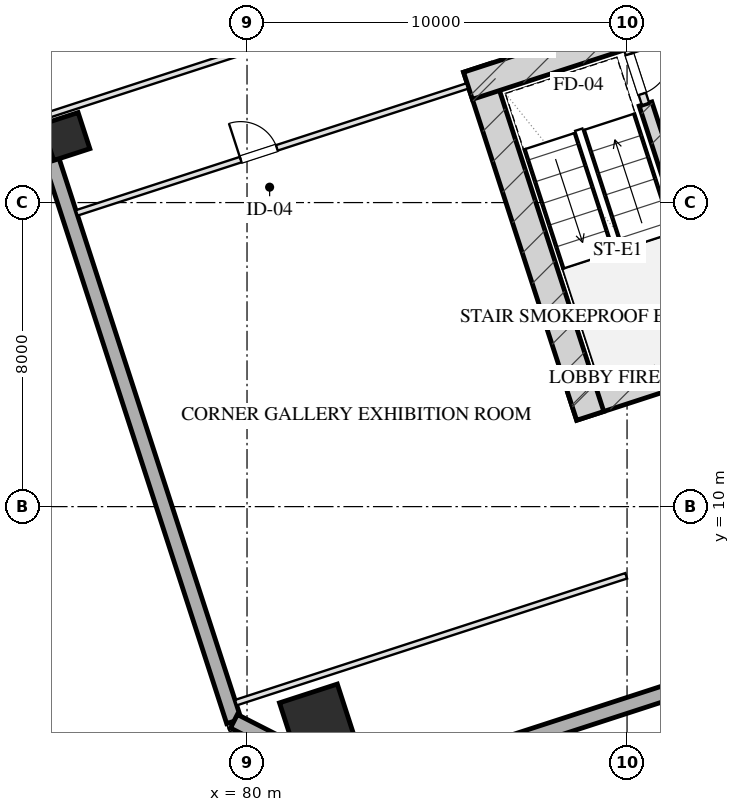
"""IFC4 building model, lengths in metres.
Left out: names, types, materials, properties, quantities, classifications, styles, units other than length and angle.
Written with IfcOpenShell. Run it as: python <this file> out.ifc"""

import sys

from ifc_helpers import new_model, si_unit, direction, frame, frame_2d, origin, origin_2d, place, context, subcontext, project, spatial, rectangle, hollow_rectangle, extrude, element, fill, save


model = new_model("IFC4")
c1 = context("Model", 3, precision=1e-05, world=origin(), true_north=direction((0.0, 1.0)))
c2 = subcontext(c1, "Body", "Model", "MODEL_VIEW")
j1 = project(units=[si_unit("LENGTHUNIT", "METRE"), si_unit("PLANEANGLEUNIT", "RADIAN")], contexts=[c1])
p1 = place(None, origin())
s1 = spatial("IfcSite", under=j1, at=p1, CompositionType="ELEMENT")
p2 = place(p1, origin())
s2 = spatial("IfcBuilding", under=s1, at=p2, CompositionType="ELEMENT")
p3 = place(p2, frame((0.0, 0.0, 30.0)))
s3 = spatial("IfcBuildingStorey", under=s2, at=p3, CompositionType="ELEMENT", Elevation=30.0)
p4 = place(p3, frame((88.559, 12.629, 0.0), z_axis=(0.0, 0.0, 1.0), x_axis=(0.951056072937, 0.309018358888, 0.0)))
e1 = element("IfcWall", 1, at=p4, inside=s3, PredefinedType="SHEAR", context=c2, shape_type="SweptSolid", body=[
    extrude(rectangle(XDim=16.55, YDim=0.75, at=frame_2d((8.275, 0.0))), origin(), (0.0, 0.0, 1.0), 4.0),
])
p5 = place(p3, frame((86.055, 21.546, 0.0), z_axis=(0.0, 0.0, 1.0), x_axis=(0.309023585745, -0.951054374604, 0.0)))
e2 = element("IfcWall", 2, at=p5, inside=s3, PredefinedType="SHEAR", context=c2, shape_type="SweptSolid", body=[
    extrude(rectangle(XDim=9.63, YDim=0.75, at=frame_2d((4.815, 0.0))), origin(), (0.0, 0.0, 1.0), 4.0),
])
p6 = place(p3, frame((90.486, 20.594, 0.0), z_axis=(0.0, 0.0, 1.0), x_axis=(0.309020428229, -0.951055400562, 0.0)))
e3 = element("IfcWall", 3, at=p6, inside=s3, PredefinedType="SHEAR", context=c2, shape_type="SweptSolid", body=[
    extrude(rectangle(XDim=6.98, YDim=0.35, at=frame_2d((3.49, 0.0))), origin(), (0.0, 0.0, 1.0), 4.0),
])
p7 = place(p3, frame((85.814, 21.074, 0.0), z_axis=(0.0, 0.0, 1.0), x_axis=(0.95106580992, 0.308988390074, 0.0)))
e4 = element("IfcWall", 4, at=p7, inside=s3, PredefinedType="SHEAR", context=c2, shape_type="SweptSolid", body=[
    extrude(rectangle(XDim=4.295, YDim=0.75, at=frame_2d((2.147, 0.0))), origin(), (0.0, 0.0, 1.0), 4.0),
])
p8 = place(p3, frame((81.863, 4.323, 0.0), z_axis=(0.0, 0.0, 1.0), x_axis=(0.951056516295, 0.309016994375, 0.0)))
e5 = element("IfcColumn", 5, at=p8, inside=s3, PredefinedType="COLUMN", context=c2, shape_type="SweptSolid", body=[
    extrude(hollow_rectangle(XDim=1.6, YDim=1.6, WallThickness=0.055, at=origin_2d()), origin(), (0.0, 0.0, 1.0), 4.001),
])
p9 = place(p3, frame((75.234, 19.739, 0.0), z_axis=(0.0, 0.0, 1.0), x_axis=(0.951056516295, 0.309016994375, 0.0)))
e6 = element("IfcColumn", 6, at=p9, inside=s3, PredefinedType="COLUMN", context=c2, shape_type="SweptSolid", body=[
    extrude(hollow_rectangle(XDim=1.0, YDim=1.0, WallThickness=0.036, at=origin_2d()), origin(), (0.0, 0.0, 1.0), 4.001),
])
p10 = place(p3, frame((79.655, 4.352, 0.0), z_axis=(0.0, 0.0, 1.0), x_axis=(-0.309014526607, 0.951057318118, 0.0)))
e7 = element("IfcWall", 7, at=p10, inside=s3, PredefinedType="SOLIDWALL", context=c2, shape_type="SweptSolid", body=[
    extrude(rectangle(XDim=50.0, YDim=0.4, at=frame_2d((25.0, 0.0))), origin(), (0.0, 0.0, 1.0), 3.16),
])
p11 = place(p10, frame((17.35, 0.0, 0.75)))
e8 = element("IfcOpeningElement", 8, at=p11, cuts=e7, PredefinedType="OPENING", context=c2, shape_type="SweptSolid", body=[
    extrude(rectangle(XDim=2.5, YDim=1.75, at=frame_2d((1.25, 0.875))), frame((0.0, 0.21, 0.0), z_axis=(0.0, -1.0, 0.0), x_axis=(1.0, 0.0, 0.0)), (0.0, 0.0, 1.0), 0.42),
])
p12 = place(p10, frame((21.15, 0.0, 0.75)))
e9 = element("IfcOpeningElement", 9, at=p12, cuts=e7, PredefinedType="OPENING", context=c2, shape_type="SweptSolid", body=[
    extrude(rectangle(XDim=2.5, YDim=1.75, at=frame_2d((1.25, 0.875))), frame((0.0, 0.21, 0.0), z_axis=(0.0, -1.0, 0.0), x_axis=(1.0, 0.0, 0.0)), (0.0, 0.0, 1.0), 0.42),
])
p13 = place(p10, frame((26.35, 0.0, 0.75)))
e10 = element("IfcOpeningElement", 10, at=p13, cuts=e7, PredefinedType="OPENING", context=c2, shape_type="SweptSolid", body=[
    extrude(rectangle(XDim=2.5, YDim=1.75, at=frame_2d((1.25, 0.875))), frame((0.0, 0.21, 0.0), z_axis=(0.0, -1.0, 0.0), x_axis=(1.0, 0.0, 0.0)), (0.0, 0.0, 1.0), 0.42),
])
p14 = place(p10, frame((30.15, 0.0, 0.75)))
e11 = element("IfcOpeningElement", 11, at=p14, cuts=e7, PredefinedType="OPENING", context=c2, shape_type="SweptSolid", body=[
    extrude(rectangle(XDim=2.5, YDim=1.75, at=frame_2d((1.25, 0.875))), frame((0.0, 0.21, 0.0), z_axis=(0.0, -1.0, 0.0), x_axis=(1.0, 0.0, 0.0)), (0.0, 0.0, 1.0), 0.42),
])
p15 = place(p3, frame((113.998, 12.567, 0.0), z_axis=(0.0, 0.0, 1.0), x_axis=(-0.951055939317, -0.309018770125, 0.0)))
e12 = element("IfcWall", 12, at=p15, inside=s3, PredefinedType="SOLIDWALL", context=c2, shape_type="SweptSolid", body=[
    extrude(rectangle(XDim=32.4, YDim=0.4, at=frame_2d((16.2, 0.0))), origin(), (0.0, 0.0, 1.0), 3.16),
])
p16 = place(p3, frame((83.184, 2.554, 0.0), z_axis=(0.0, 0.0, 1.0), x_axis=(-0.890998089617, 0.454007053137, 0.0)))
e13 = element("IfcWall", 13, at=p16, inside=s3, PredefinedType="SOLIDWALL", context=c2, shape_type="SweptSolid", body=[
    extrude(rectangle(XDim=3.96, YDim=0.4, at=frame_2d((1.98, 0.0))), origin(), (0.0, 0.0, 1.0), 3.16),
])
p17 = place(p3, frame((89.899, 22.401, 0.0), z_axis=(0.0, 0.0, 1.0), x_axis=(0.308932062672, -0.951084108086, 0.0)))
e14 = element("IfcWall", 14, at=p17, inside=s3, PredefinedType="PARTITIONING", context=c2, shape_type="SweptSolid", body=[
    extrude(rectangle(XDim=1.9, YDim=0.2, at=frame_2d((0.95, 0.0))), origin(), (0.0, 0.0, 1.0), 3.725),
])
p18 = place(p17, frame((0.52, 0.0, 0.0)))
e15 = element("IfcOpeningElement", 15, at=p18, cuts=e14, PredefinedType="OPENING", context=c2, shape_type="SweptSolid", body=[
    extrude(rectangle(XDim=1.1, YDim=2.05, at=frame_2d((0.55, 1.025))), frame((0.0, 0.11, 0.0), z_axis=(0.0, -1.0, 0.0), x_axis=(1.0, 0.0, 0.0)), (0.0, 0.0, 1.0), 0.22),
])
p19 = place(p3, frame((79.707, 4.842, 0.0), z_axis=(0.0, 0.0, 1.0), x_axis=(0.951056658866, 0.309016555588, 0.0)))
e16 = element("IfcWall", 16, at=p19, inside=s3, PredefinedType="PARTITIONING", context=c2, shape_type="SweptSolid", body=[
    extrude(rectangle(XDim=10.8, YDim=0.15, at=frame_2d((5.4, 0.0))), origin(), (0.0, 0.0, 1.0), 3.725),
])
p20 = place(p3, frame((75.519, 17.729, 0.0), z_axis=(0.0, 0.0, 1.0), x_axis=(0.951056658866, 0.309016555588, 0.0)))
e17 = element("IfcWall", 17, at=p20, inside=s3, PredefinedType="PARTITIONING", context=c2, shape_type="SweptSolid", body=[
    extrude(rectangle(XDim=10.8, YDim=0.15, at=frame_2d((5.4, 0.0))), origin(), (0.0, 0.0, 1.0), 3.725),
])
p21 = place(p20, frame((4.536, 0.0, 0.0)))
e18 = element("IfcOpeningElement", 18, at=p21, cuts=e17, PredefinedType="OPENING", context=c2, shape_type="SweptSolid", body=[
    extrude(rectangle(XDim=1.0, YDim=2.05, at=frame_2d((0.5, 1.025))), frame((0.0, 0.085, 0.0), z_axis=(0.0, -1.0, 0.0), x_axis=(1.0, 0.0, 0.0)), (0.0, 0.0, 1.0), 0.17),
])
p22 = place(p3, frame((74.691, 20.278, 0.0), z_axis=(0.0, 0.0, 1.0), x_axis=(0.951052712421, 0.309028701251, 0.0)))
e19 = element("IfcWall", 19, at=p22, inside=s3, PredefinedType="PARTITIONING", context=c2, shape_type="SweptSolid", body=[
    extrude(rectangle(XDim=13.375, YDim=0.15, at=frame_2d((6.688, 0.0))), origin(), (0.0, 0.0, 1.0), 3.725),
])
p23 = place(p18, origin())
e20 = element("IfcDoor", 20, at=p23, inside=s3, OperationType="SINGLE_SWING_LEFT", PredefinedType="DOOR", context=c2, shape_type="SweptSolid", body=[
    extrude(rectangle(XDim=1.1, YDim=2.05, at=frame_2d((0.55, 1.025))), frame((0.0, 0.025, 0.0), z_axis=(0.0, -1.0, 0.0), x_axis=(1.0, 0.0, 0.0)), (0.0, 0.0, 1.0), 0.05),
])
fill(e15, e20)
p24 = place(p21, origin())
e21 = element("IfcDoor", 21, at=p24, inside=s3, OperationType="SINGLE_SWING_LEFT", PredefinedType="DOOR", context=c2, shape_type="SweptSolid", body=[
    extrude(rectangle(XDim=1.0, YDim=2.05, at=frame_2d((0.5, 1.025))), frame((0.0, 0.025, 0.0), z_axis=(0.0, -1.0, 0.0), x_axis=(1.0, 0.0, 0.0)), (0.0, 0.0, 1.0), 0.05),
])
fill(e18, e21)
save(model, sys.argv[1])
